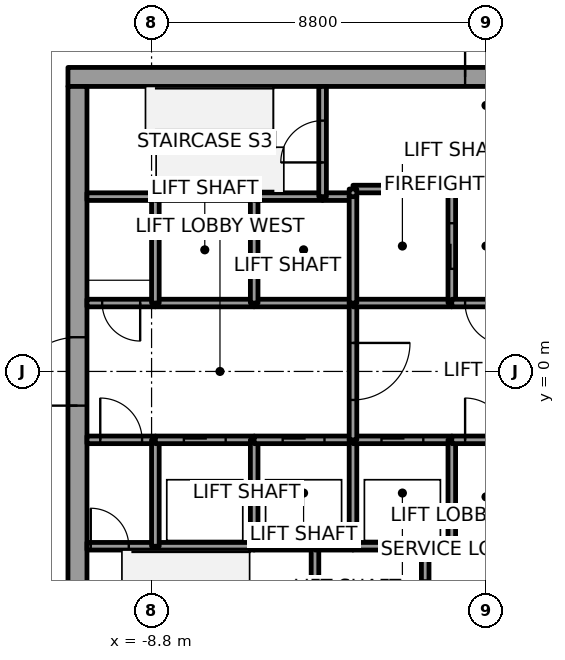
"""IFC4 building model, lengths in metres.
Left out: names, types, materials, properties, quantities, classifications, styles, units other than length and angle.
Written with IfcOpenShell. Run it as: python <this file> out.ifc"""

import sys

from ifc_helpers import new_model, si_unit, direction, frame, frame_2d, origin, place, context, subcontext, project, spatial, rectangle, extrude, element, fill, save


model = new_model("IFC4")
c1 = context("Model", 3, precision=1e-05, world=origin(), true_north=direction((0.0, 1.0)))
c2 = subcontext(c1, "Body", "Model", "MODEL_VIEW")
j1 = project(units=[si_unit("LENGTHUNIT", "METRE"), si_unit("PLANEANGLEUNIT", "RADIAN")], contexts=[c1])
p1 = place(None, origin())
s1 = spatial("IfcSite", under=j1, at=p1, CompositionType="ELEMENT")
p2 = place(p1, origin())
s2 = spatial("IfcBuilding", under=s1, at=p2, CompositionType="ELEMENT")
p3 = place(p2, frame((0.0, 0.0, 133.8)))
s3 = spatial("IfcBuildingStorey", under=s2, at=p3, CompositionType="ELEMENT", Elevation=133.8)
p4 = place(p3, frame((-11.0, 7.75, 0.0), z_axis=(0.0, 0.0, 1.0), x_axis=(1.0, 0.0, 0.0)))
e1 = element("IfcWall", 1, at=p4, inside=s3, PredefinedType="SHEAR", context=c2, shape_type="SweptSolid", body=[
    extrude(rectangle(XDim=22.0, YDim=0.5, at=frame_2d((11.0, 0.0))), origin(), (0.0, 0.0, 1.0), 4.0),
])
p5 = place(p4, frame((10.45, 0.0, 0.0)))
e2 = element("IfcOpeningElement", 2, at=p5, cuts=e1, PredefinedType="OPENING", context=c2, shape_type="SweptSolid", body=[
    extrude(rectangle(XDim=1.1, YDim=2.1, at=frame_2d((0.55, 1.05))), frame((0.0, 0.25, 0.0), z_axis=(0.0, -1.0, 0.0), x_axis=(1.0, 0.0, 0.0)), (0.0, 0.0, 1.0), 0.5),
])
p6 = place(p3, frame((-10.75, -7.5, 0.0), z_axis=(0.0, 0.0, 1.0), x_axis=(0.0, 1.0, 0.0)))
e3 = element("IfcWall", 3, at=p6, inside=s3, PredefinedType="SHEAR", context=c2, shape_type="SweptSolid", body=[
    extrude(rectangle(XDim=15.0, YDim=0.5, at=frame_2d((7.5, 0.0))), origin(), (0.0, 0.0, 1.0), 4.0),
])
p7 = place(p6, frame((6.6, 0.0, 0.0)))
e4 = element("IfcOpeningElement", 4, at=p7, cuts=e3, PredefinedType="OPENING", context=c2, shape_type="SweptSolid", body=[
    extrude(rectangle(XDim=1.8, YDim=2.1, at=frame_2d((0.9, 1.05))), frame((0.0, 0.25, 0.0), z_axis=(0.0, -1.0, 0.0), x_axis=(1.0, 0.0, 0.0)), (0.0, 0.0, 1.0), 0.5),
])
p8 = place(p3, frame((-10.5, -4.6, 0.0), z_axis=(0.0, 0.0, 1.0), x_axis=(1.0, 0.0, 0.0)))
e5 = element("IfcWall", 5, at=p8, inside=s3, PredefinedType="SOLIDWALL", context=c2, shape_type="SweptSolid", body=[
    extrude(rectangle(XDim=1.8, YDim=0.2, at=frame_2d((0.9, 0.0))), origin(), (0.0, 0.0, 1.0), 3.85),
])
p9 = place(p8, frame((0.1, 0.0, 0.0)))
e6 = element("IfcOpeningElement", 6, at=p9, cuts=e5, PredefinedType="OPENING", context=c2, shape_type="SweptSolid", body=[
    extrude(rectangle(XDim=1.0, YDim=2.1, at=frame_2d((0.5, 1.05))), frame((0.0, 0.1, 0.0), z_axis=(0.0, -1.0, 0.0), x_axis=(1.0, 0.0, 0.0)), (0.0, 0.0, 1.0), 0.2),
])
p10 = place(p3, frame((-10.5, -1.8, 0.0), z_axis=(0.0, 0.0, 1.0), x_axis=(1.0, 0.0, 0.0)))
e7 = element("IfcWall", 7, at=p10, inside=s3, PredefinedType="SOLIDWALL", context=c2, shape_type="SweptSolid", body=[
    extrude(rectangle(XDim=1.8, YDim=0.2, at=frame_2d((0.9, 0.0))), origin(), (0.0, 0.0, 1.0), 3.85),
])
p11 = place(p10, frame((0.35, 0.0, 0.0)))
e8 = element("IfcOpeningElement", 8, at=p11, cuts=e7, PredefinedType="OPENING", context=c2, shape_type="SweptSolid", body=[
    extrude(rectangle(XDim=1.1, YDim=2.1, at=frame_2d((0.55, 1.05))), frame((0.0, 0.1, 0.0), z_axis=(0.0, -1.0, 0.0), x_axis=(1.0, 0.0, 0.0)), (0.0, 0.0, 1.0), 0.2),
])
p12 = place(p3, frame((-8.7, 1.8, 0.0), z_axis=(0.0, 0.0, 1.0), x_axis=(-1.0, 0.0, 0.0)))
e9 = element("IfcWall", 9, at=p12, inside=s3, PredefinedType="SOLIDWALL", context=c2, shape_type="SweptSolid", body=[
    extrude(rectangle(XDim=1.8, YDim=0.2, at=frame_2d((0.9, 0.0))), origin(), (0.0, 0.0, 1.0), 3.85),
])
p13 = place(p12, frame((0.4, 0.0, 0.0)))
e10 = element("IfcOpeningElement", 10, at=p13, cuts=e9, PredefinedType="OPENING", context=c2, shape_type="SweptSolid", body=[
    extrude(rectangle(XDim=1.0, YDim=2.1, at=frame_2d((0.5, 1.05))), frame((0.0, 0.1, 0.0), z_axis=(0.0, -1.0, 0.0), x_axis=(1.0, 0.0, 0.0)), (0.0, 0.0, 1.0), 0.2),
])
p14 = place(p3, frame((-8.7, 4.6, 0.0), z_axis=(0.0, 0.0, 1.0), x_axis=(-1.0, 0.0, 0.0)))
e11 = element("IfcWall", 11, at=p14, inside=s3, PredefinedType="SOLIDWALL", context=c2, shape_type="SweptSolid", body=[
    extrude(rectangle(XDim=1.8, YDim=0.2, at=frame_2d((0.9, 0.0))), origin(), (0.0, 0.0, 1.0), 3.85),
])
p15 = place(p3, frame((-8.7, -4.6, 0.0), z_axis=(0.0, 0.0, 1.0), x_axis=(1.0, 0.0, 0.0)))
e12 = element("IfcWall", 12, at=p15, inside=s3, PredefinedType="SOLIDWALL", context=c2, shape_type="SweptSolid", body=[
    extrude(rectangle(XDim=2.6, YDim=0.2, at=frame_2d((1.3, 0.0))), origin(), (0.0, 0.0, 1.0), 3.85),
])
p16 = place(p3, frame((-8.7, -4.6, 0.0), z_axis=(0.0, 0.0, 1.0), x_axis=(0.0, 1.0, 0.0)))
e13 = element("IfcWall", 13, at=p16, inside=s3, PredefinedType="SOLIDWALL", context=c2, shape_type="SweptSolid", body=[
    extrude(rectangle(XDim=2.8, YDim=0.2, at=frame_2d((1.4, 0.0))), origin(), (0.0, 0.0, 1.0), 3.85),
])
p17 = place(p3, frame((-8.7, -1.8, 0.0), z_axis=(0.0, 0.0, 1.0), x_axis=(1.0, 0.0, 0.0)))
e14 = element("IfcWall", 14, at=p17, inside=s3, PredefinedType="SOLIDWALL", context=c2, shape_type="SweptSolid", body=[
    extrude(rectangle(XDim=2.6, YDim=0.2, at=frame_2d((1.3, 0.0))), origin(), (0.0, 0.0, 1.0), 3.85),
])
p18 = place(p17, frame((0.75, 0.0, 0.0)))
e15 = element("IfcOpeningElement", 15, at=p18, cuts=e14, PredefinedType="OPENING", context=c2, shape_type="SweptSolid", body=[
    extrude(rectangle(XDim=1.1, YDim=2.1, at=frame_2d((0.55, 1.05))), frame((0.0, 0.1, 0.0), z_axis=(0.0, -1.0, 0.0), x_axis=(1.0, 0.0, 0.0)), (0.0, 0.0, 1.0), 0.2),
])
p19 = place(p3, frame((-6.1, 1.8, 0.0), z_axis=(0.0, 0.0, 1.0), x_axis=(-1.0, 0.0, 0.0)))
e16 = element("IfcWall", 16, at=p19, inside=s3, PredefinedType="SOLIDWALL", context=c2, shape_type="SweptSolid", body=[
    extrude(rectangle(XDim=2.6, YDim=0.2, at=frame_2d((1.3, 0.0))), origin(), (0.0, 0.0, 1.0), 3.85),
])
p20 = place(p3, frame((-8.7, 1.8, 0.0), z_axis=(0.0, 0.0, 1.0), x_axis=(0.0, 1.0, 0.0)))
e17 = element("IfcWall", 17, at=p20, inside=s3, PredefinedType="SOLIDWALL", context=c2, shape_type="SweptSolid", body=[
    extrude(rectangle(XDim=2.8, YDim=0.2, at=frame_2d((1.4, 0.0))), origin(), (0.0, 0.0, 1.0), 3.85),
])
p21 = place(p3, frame((-6.1, 4.6, 0.0), z_axis=(0.0, 0.0, 1.0), x_axis=(-1.0, 0.0, 0.0)))
e18 = element("IfcWall", 18, at=p21, inside=s3, PredefinedType="SOLIDWALL", context=c2, shape_type="SweptSolid", body=[
    extrude(rectangle(XDim=2.6, YDim=0.2, at=frame_2d((1.3, 0.0))), origin(), (0.0, 0.0, 1.0), 3.85),
])
p22 = place(p3, frame((-6.1, -4.6, 0.0), z_axis=(0.0, 0.0, 1.0), x_axis=(1.0, 0.0, 0.0)))
e19 = element("IfcWall", 19, at=p22, inside=s3, PredefinedType="SOLIDWALL", context=c2, shape_type="SweptSolid", body=[
    extrude(rectangle(XDim=1.6, YDim=0.2, at=frame_2d((0.8, 0.0))), origin(), (0.0, 0.0, 1.0), 3.85),
])
p23 = place(p3, frame((-6.1, -4.6, 0.0), z_axis=(0.0, 0.0, 1.0), x_axis=(0.0, 1.0, 0.0)))
e20 = element("IfcWall", 20, at=p23, inside=s3, PredefinedType="SOLIDWALL", context=c2, shape_type="SweptSolid", body=[
    extrude(rectangle(XDim=2.8, YDim=0.2, at=frame_2d((1.4, 0.0))), origin(), (0.0, 0.0, 1.0), 3.85),
])
p24 = place(p3, frame((-6.1, -1.8, 0.0), z_axis=(0.0, 0.0, 1.0), x_axis=(1.0, 0.0, 0.0)))
e21 = element("IfcWall", 21, at=p24, inside=s3, PredefinedType="SOLIDWALL", context=c2, shape_type="SweptSolid", body=[
    extrude(rectangle(XDim=2.6, YDim=0.2, at=frame_2d((1.3, 0.0))), origin(), (0.0, 0.0, 1.0), 3.85),
])
p25 = place(p24, frame((0.75, 0.0, 0.0)))
e22 = element("IfcOpeningElement", 22, at=p25, cuts=e21, PredefinedType="OPENING", context=c2, shape_type="SweptSolid", body=[
    extrude(rectangle(XDim=1.1, YDim=2.1, at=frame_2d((0.55, 1.05))), frame((0.0, 0.1, 0.0), z_axis=(0.0, -1.0, 0.0), x_axis=(1.0, 0.0, 0.0)), (0.0, 0.0, 1.0), 0.2),
])
p26 = place(p3, frame((-3.5, 1.8, 0.0), z_axis=(0.0, 0.0, 1.0), x_axis=(-1.0, 0.0, 0.0)))
e23 = element("IfcWall", 23, at=p26, inside=s3, PredefinedType="SOLIDWALL", context=c2, shape_type="SweptSolid", body=[
    extrude(rectangle(XDim=2.6, YDim=0.2, at=frame_2d((1.3, 0.0))), origin(), (0.0, 0.0, 1.0), 3.85),
])
p27 = place(p3, frame((-6.1, 1.8, 0.0), z_axis=(0.0, 0.0, 1.0), x_axis=(0.0, 1.0, 0.0)))
e24 = element("IfcWall", 24, at=p27, inside=s3, PredefinedType="SOLIDWALL", context=c2, shape_type="SweptSolid", body=[
    extrude(rectangle(XDim=2.8, YDim=0.2, at=frame_2d((1.4, 0.0))), origin(), (0.0, 0.0, 1.0), 3.85),
])
p28 = place(p3, frame((-4.3, 4.6, 0.0), z_axis=(0.0, 0.0, 1.0), x_axis=(-1.0, 0.0, 0.0)))
e25 = element("IfcWall", 25, at=p28, inside=s3, PredefinedType="SOLIDWALL", context=c2, shape_type="SweptSolid", body=[
    extrude(rectangle(XDim=1.8, YDim=0.2, at=frame_2d((0.9, 0.0))), origin(), (0.0, 0.0, 1.0), 3.85),
])
p29 = place(p3, frame((-4.5, -4.6, 0.0), z_axis=(0.0, 0.0, 1.0), x_axis=(0.0, -1.0, 0.0)))
e26 = element("IfcWall", 26, at=p29, inside=s3, PredefinedType="SOLIDWALL", context=c2, shape_type="SweptSolid", body=[
    extrude(rectangle(XDim=2.9, YDim=0.2, at=frame_2d((1.45, 0.0))), origin(), (0.0, 0.0, 1.0), 3.85),
])
p30 = place(p3, frame((-4.5, -4.6, 0.0), z_axis=(0.0, 0.0, 1.0), x_axis=(1.0, 0.0, 0.0)))
e27 = element("IfcWall", 27, at=p30, inside=s3, PredefinedType="SOLIDWALL", context=c2, shape_type="SweptSolid", body=[
    extrude(rectangle(XDim=1.0, YDim=0.2, at=frame_2d((0.5, 0.0))), origin(), (0.0, 0.0, 1.0), 3.85),
])
p31 = place(p3, frame((-3.5, 4.6, 0.0), z_axis=(0.0, 0.0, 1.0), x_axis=(-1.0, 0.0, 0.0)))
e28 = element("IfcWall", 28, at=p31, inside=s3, PredefinedType="SOLIDWALL", context=c2, shape_type="SweptSolid", body=[
    extrude(rectangle(XDim=0.8, YDim=0.2, at=frame_2d((0.4, 0.0))), origin(), (0.0, 0.0, 1.0), 3.85),
])
p32 = place(p3, frame((-4.3, 4.6, 0.0), z_axis=(0.0, 0.0, 1.0), x_axis=(0.0, 1.0, 0.0)))
e29 = element("IfcWall", 29, at=p32, inside=s3, PredefinedType="SOLIDWALL", context=c2, shape_type="SweptSolid", body=[
    extrude(rectangle(XDim=2.9, YDim=0.2, at=frame_2d((1.45, 0.0))), origin(), (0.0, 0.0, 1.0), 3.85),
])
p33 = place(p32, frame((0.9, 0.0, 0.0)))
e30 = element("IfcOpeningElement", 30, at=p33, cuts=e29, PredefinedType="OPENING", context=c2, shape_type="SweptSolid", body=[
    extrude(rectangle(XDim=1.1, YDim=2.1, at=frame_2d((0.55, 1.05))), frame((0.0, 0.1, 0.0), z_axis=(0.0, -1.0, 0.0), x_axis=(1.0, 0.0, 0.0)), (0.0, 0.0, 1.0), 0.2),
])
p34 = place(p3, frame((-3.5, -4.6, 0.0), z_axis=(0.0, 0.0, 1.0), x_axis=(1.0, 0.0, 0.0)))
e31 = element("IfcWall", 31, at=p34, inside=s3, PredefinedType="SOLIDWALL", context=c2, shape_type="SweptSolid", body=[
    extrude(rectangle(XDim=1.9, YDim=0.2, at=frame_2d((0.95, 0.0))), origin(), (0.0, 0.0, 1.0), 3.85),
])
p35 = place(p3, frame((-3.5, -4.6, 0.0), z_axis=(0.0, 0.0, 1.0), x_axis=(0.0, 1.0, 0.0)))
e32 = element("IfcWall", 32, at=p35, inside=s3, PredefinedType="SOLIDWALL", context=c2, shape_type="SweptSolid", body=[
    extrude(rectangle(XDim=2.8, YDim=0.2, at=frame_2d((1.4, 0.0))), origin(), (0.0, 0.0, 1.0), 3.85),
])
p36 = place(p3, frame((-3.5, -1.8, 0.0), z_axis=(0.0, 0.0, 1.0), x_axis=(1.0, 0.0, 0.0)))
e33 = element("IfcWall", 33, at=p36, inside=s3, PredefinedType="SOLIDWALL", context=c2, shape_type="SweptSolid", body=[
    extrude(rectangle(XDim=2.6, YDim=0.2, at=frame_2d((1.3, 0.0))), origin(), (0.0, 0.0, 1.0), 3.85),
])
p37 = place(p36, frame((0.75, 0.0, 0.0)))
e34 = element("IfcOpeningElement", 34, at=p37, cuts=e33, PredefinedType="OPENING", context=c2, shape_type="SweptSolid", body=[
    extrude(rectangle(XDim=1.1, YDim=2.1, at=frame_2d((0.55, 1.05))), frame((0.0, 0.1, 0.0), z_axis=(0.0, -1.0, 0.0), x_axis=(1.0, 0.0, 0.0)), (0.0, 0.0, 1.0), 0.2),
])
p38 = place(p3, frame((-3.5, 1.8, 0.0), z_axis=(0.0, 0.0, 1.0), x_axis=(0.0, -1.0, 0.0)))
e35 = element("IfcWall", 35, at=p38, inside=s3, PredefinedType="SOLIDWALL", context=c2, shape_type="SweptSolid", body=[
    extrude(rectangle(XDim=3.6, YDim=0.2, at=frame_2d((1.8, 0.0))), origin(), (0.0, 0.0, 1.0), 3.85),
])
p39 = place(p38, frame((1.05, 0.0, 0.0)))
e36 = element("IfcOpeningElement", 36, at=p39, cuts=e35, PredefinedType="OPENING", context=c2, shape_type="SweptSolid", body=[
    extrude(rectangle(XDim=1.5, YDim=2.1, at=frame_2d((0.75, 1.05))), frame((0.0, 0.1, 0.0), z_axis=(0.0, -1.0, 0.0), x_axis=(1.0, 0.0, 0.0)), (0.0, 0.0, 1.0), 0.2),
])
p40 = place(p3, frame((-0.9, 1.8, 0.0), z_axis=(0.0, 0.0, 1.0), x_axis=(-1.0, 0.0, 0.0)))
e37 = element("IfcWall", 37, at=p40, inside=s3, PredefinedType="SOLIDWALL", context=c2, shape_type="SweptSolid", body=[
    extrude(rectangle(XDim=2.6, YDim=0.2, at=frame_2d((1.3, 0.0))), origin(), (0.0, 0.0, 1.0), 3.85),
])
p41 = place(p3, frame((-3.5, 4.6, 0.0), z_axis=(0.0, 0.0, 1.0), x_axis=(0.0, -1.0, 0.0)))
e38 = element("IfcWall", 38, at=p41, inside=s3, PredefinedType="SOLIDWALL", context=c2, shape_type="SweptSolid", body=[
    extrude(rectangle(XDim=2.8, YDim=0.2, at=frame_2d((1.4, 0.0))), origin(), (0.0, 0.0, 1.0), 3.85),
])
p42 = place(p3, frame((-0.9, 1.8, 0.0), z_axis=(0.0, 0.0, 1.0), x_axis=(0.0, 1.0, 0.0)))
e39 = element("IfcWall", 39, at=p42, inside=s3, PredefinedType="SOLIDWALL", context=c2, shape_type="SweptSolid", body=[
    extrude(rectangle(XDim=3.0, YDim=0.2, at=frame_2d((1.5, 0.0))), origin(), (0.0, 0.0, 1.0), 3.85),
])
p43 = place(p42, frame((0.9, 0.0, 0.0)))
e40 = element("IfcOpeningElement", 40, at=p43, cuts=e39, PredefinedType="OPENING", context=c2, shape_type="SweptSolid", body=[
    extrude(rectangle(XDim=1.2, YDim=2.1, at=frame_2d((0.6, 1.05))), frame((0.0, 0.1, 0.0), z_axis=(0.0, -1.0, 0.0), x_axis=(1.0, 0.0, 0.0)), (0.0, 0.0, 1.0), 0.2),
])
p44 = place(p3, frame((-0.9, 4.8, 0.0), z_axis=(0.0, 0.0, 1.0), x_axis=(-1.0, 0.0, 0.0)))
e41 = element("IfcWall", 41, at=p44, inside=s3, PredefinedType="SOLIDWALL", context=c2, shape_type="SweptSolid", body=[
    extrude(rectangle(XDim=2.6, YDim=0.2, at=frame_2d((1.3, 0.0))), origin(), (0.0, 0.0, 1.0), 3.85),
])
p45 = place(p3, frame((-3.5, 4.8, 0.0), z_axis=(0.0, 0.0, 1.0), x_axis=(0.0, -1.0, 0.0)))
e42 = element("IfcWall", 42, at=p45, inside=s3, PredefinedType="SOLIDWALL", context=c2, shape_type="SweptSolid", body=[
    extrude(rectangle(XDim=0.2, YDim=0.2, at=frame_2d((0.1, 0.0))), origin(), (0.0, 0.0, 1.0), 3.85),
])
p46 = place(p3, frame((-1.6, -7.5, 0.0), z_axis=(0.0, 0.0, 1.0), x_axis=(0.0, 1.0, 0.0)))
e43 = element("IfcWall", 43, at=p46, inside=s3, PredefinedType="SOLIDWALL", context=c2, shape_type="SweptSolid", body=[
    extrude(rectangle(XDim=2.9, YDim=0.2, at=frame_2d((1.45, 0.0))), origin(), (0.0, 0.0, 1.0), 3.85),
])
p47 = place(p46, frame((0.9, 0.0, 0.0)))
e44 = element("IfcOpeningElement", 44, at=p47, cuts=e43, PredefinedType="OPENING", context=c2, shape_type="SweptSolid", body=[
    extrude(rectangle(XDim=1.1, YDim=2.1, at=frame_2d((0.55, 1.05))), frame((0.0, 0.1, 0.0), z_axis=(0.0, -1.0, 0.0), x_axis=(1.0, 0.0, 0.0)), (0.0, 0.0, 1.0), 0.2),
])
p48 = place(p3, frame((-1.6, -4.6, 0.0), z_axis=(0.0, 0.0, 1.0), x_axis=(1.0, 0.0, 0.0)))
e45 = element("IfcWall", 45, at=p48, inside=s3, PredefinedType="SOLIDWALL", context=c2, shape_type="SweptSolid", body=[
    extrude(rectangle(XDim=0.7, YDim=0.2, at=frame_2d((0.35, 0.0))), origin(), (0.0, 0.0, 1.0), 3.85),
])
p49 = place(p3, frame((-0.9, -4.6, 0.0), z_axis=(0.0, 0.0, 1.0), x_axis=(0.0, 1.0, 0.0)))
e46 = element("IfcWall", 46, at=p49, inside=s3, PredefinedType="SOLIDWALL", context=c2, shape_type="SweptSolid", body=[
    extrude(rectangle(XDim=2.8, YDim=0.2, at=frame_2d((1.4, 0.0))), origin(), (0.0, 0.0, 1.0), 3.85),
])
p50 = place(p3, frame((-0.9, -1.8, 0.0), z_axis=(0.0, 0.0, 1.0), x_axis=(1.0, 0.0, 0.0)))
e47 = element("IfcWall", 47, at=p50, inside=s3, PredefinedType="SOLIDWALL", context=c2, shape_type="SweptSolid", body=[
    extrude(rectangle(XDim=1.8, YDim=0.2, at=frame_2d((0.9, 0.0))), origin(), (0.0, 0.0, 1.0), 3.85),
])
p51 = place(p50, frame((0.35, 0.0, 0.0)))
e48 = element("IfcOpeningElement", 48, at=p51, cuts=e47, PredefinedType="OPENING", context=c2, shape_type="SweptSolid", body=[
    extrude(rectangle(XDim=1.1, YDim=2.1, at=frame_2d((0.55, 1.05))), frame((0.0, 0.1, 0.0), z_axis=(0.0, -1.0, 0.0), x_axis=(1.0, 0.0, 0.0)), (0.0, 0.0, 1.0), 0.2),
])
p52 = place(p3, frame((0.9, 1.8, 0.0), z_axis=(0.0, 0.0, 1.0), x_axis=(-1.0, 0.0, 0.0)))
e49 = element("IfcWall", 49, at=p52, inside=s3, PredefinedType="SOLIDWALL", context=c2, shape_type="SweptSolid", body=[
    extrude(rectangle(XDim=1.8, YDim=0.2, at=frame_2d((0.9, 0.0))), origin(), (0.0, 0.0, 1.0), 3.85),
])
p53 = place(p52, frame((0.35, 0.0, 0.0)))
e50 = element("IfcOpeningElement", 50, at=p53, cuts=e49, PredefinedType="OPENING", context=c2, shape_type="SweptSolid", body=[
    extrude(rectangle(XDim=1.1, YDim=2.1, at=frame_2d((0.55, 1.05))), frame((0.0, 0.1, 0.0), z_axis=(0.0, -1.0, 0.0), x_axis=(1.0, 0.0, 0.0)), (0.0, 0.0, 1.0), 0.2),
])
p54 = place(p18, origin())
e51 = element("IfcDoor", 51, at=p54, inside=s3, OperationType="SLIDING_TO_RIGHT", PredefinedType="DOOR", context=c2, shape_type="SweptSolid", body=[
    extrude(rectangle(XDim=1.1, YDim=2.1, at=frame_2d((0.55, 1.05))), frame((0.0, 0.025, 0.0), z_axis=(0.0, -1.0, 0.0), x_axis=(1.0, 0.0, 0.0)), (0.0, 0.0, 1.0), 0.05),
])
fill(e15, e51)
p55 = place(p25, origin())
e52 = element("IfcDoor", 52, at=p55, inside=s3, OperationType="SLIDING_TO_LEFT", PredefinedType="DOOR", context=c2, shape_type="SweptSolid", body=[
    extrude(rectangle(XDim=1.1, YDim=2.1, at=frame_2d((0.55, 1.05))), frame((0.0, 0.025, 0.0), z_axis=(0.0, -1.0, 0.0), x_axis=(1.0, 0.0, 0.0)), (0.0, 0.0, 1.0), 0.05),
])
fill(e22, e52)
p56 = place(p37, origin())
e53 = element("IfcDoor", 53, at=p56, inside=s3, OperationType="SLIDING_TO_LEFT", PredefinedType="DOOR", context=c2, shape_type="SweptSolid", body=[
    extrude(rectangle(XDim=1.1, YDim=2.1, at=frame_2d((0.55, 1.05))), frame((0.0, 0.025, 0.0), z_axis=(0.0, -1.0, 0.0), x_axis=(1.0, 0.0, 0.0)), (0.0, 0.0, 1.0), 0.05),
])
fill(e34, e53)
p57 = place(p43, origin())
e54 = element("IfcDoor", 54, at=p57, inside=s3, OperationType="SLIDING_TO_LEFT", PredefinedType="DOOR", context=c2, shape_type="SweptSolid", body=[
    extrude(rectangle(XDim=1.2, YDim=2.1, at=frame_2d((0.6, 1.05))), frame((0.0, 0.025, 0.0), z_axis=(0.0, -1.0, 0.0), x_axis=(1.0, 0.0, 0.0)), (0.0, 0.0, 1.0), 0.05),
])
fill(e40, e54)
p58 = place(p39, origin())
e55 = element("IfcDoor", 55, at=p58, inside=s3, OperationType="DOUBLE_DOOR_SINGLE_SWING", PredefinedType="DOOR", context=c2, shape_type="SweptSolid", body=[
    extrude(rectangle(XDim=1.5, YDim=2.1, at=frame_2d((0.75, 1.05))), frame((0.0, 0.025, 0.0), z_axis=(0.0, -1.0, 0.0), x_axis=(1.0, 0.0, 0.0)), (0.0, 0.0, 1.0), 0.05),
])
fill(e36, e55)
p59 = place(p11, origin())
e56 = element("IfcDoor", 56, at=p59, inside=s3, OperationType="SINGLE_SWING_LEFT", PredefinedType="DOOR", context=c2, shape_type="SweptSolid", body=[
    extrude(rectangle(XDim=1.1, YDim=2.1, at=frame_2d((0.55, 1.05))), frame((0.0, 0.025, 0.0), z_axis=(0.0, -1.0, 0.0), x_axis=(1.0, 0.0, 0.0)), (0.0, 0.0, 1.0), 0.05),
])
fill(e8, e56)
p60 = place(p53, origin())
e57 = element("IfcDoor", 57, at=p60, inside=s3, OperationType="SINGLE_SWING_RIGHT", PredefinedType="DOOR", context=c2, shape_type="SweptSolid", body=[
    extrude(rectangle(XDim=1.1, YDim=2.1, at=frame_2d((0.55, 1.05))), frame((0.0, 0.025, 0.0), z_axis=(0.0, -1.0, 0.0), x_axis=(1.0, 0.0, 0.0)), (0.0, 0.0, 1.0), 0.05),
])
fill(e50, e57)
p61 = place(p51, origin())
e58 = element("IfcDoor", 58, at=p61, inside=s3, OperationType="SINGLE_SWING_RIGHT", PredefinedType="DOOR", context=c2, shape_type="SweptSolid", body=[
    extrude(rectangle(XDim=1.1, YDim=2.1, at=frame_2d((0.55, 1.05))), frame((0.0, 0.025, 0.0), z_axis=(0.0, -1.0, 0.0), x_axis=(1.0, 0.0, 0.0)), (0.0, 0.0, 1.0), 0.05),
])
fill(e48, e58)
p62 = place(p13, origin())
e59 = element("IfcDoor", 59, at=p62, inside=s3, OperationType="SINGLE_SWING_LEFT", PredefinedType="DOOR", context=c2, shape_type="SweptSolid", body=[
    extrude(rectangle(XDim=1.0, YDim=2.1, at=frame_2d((0.5, 1.05))), frame((0.0, 0.025, 0.0), z_axis=(0.0, -1.0, 0.0), x_axis=(1.0, 0.0, 0.0)), (0.0, 0.0, 1.0), 0.05),
])
fill(e10, e59)
p63 = place(p9, origin())
e60 = element("IfcDoor", 60, at=p63, inside=s3, OperationType="SINGLE_SWING_LEFT", PredefinedType="DOOR", context=c2, shape_type="SweptSolid", body=[
    extrude(rectangle(XDim=1.0, YDim=2.1, at=frame_2d((0.5, 1.05))), frame((0.0, 0.025, 0.0), z_axis=(0.0, -1.0, 0.0), x_axis=(1.0, 0.0, 0.0)), (0.0, 0.0, 1.0), 0.05),
])
fill(e6, e60)
p64 = place(p33, origin())
e61 = element("IfcDoor", 61, at=p64, inside=s3, OperationType="SINGLE_SWING_RIGHT", PredefinedType="DOOR", context=c2, shape_type="SweptSolid", body=[
    extrude(rectangle(XDim=1.1, YDim=2.1, at=frame_2d((0.55, 1.05))), frame((0.0, 0.025, 0.0), z_axis=(0.0, -1.0, 0.0), x_axis=(1.0, 0.0, 0.0)), (0.0, 0.0, 1.0), 0.05),
])
fill(e30, e61)
p65 = place(p7, origin())
e62 = element("IfcDoor", 62, at=p65, inside=s3, OperationType="DOUBLE_DOOR_SINGLE_SWING", PredefinedType="DOOR", context=c2, shape_type="SweptSolid", body=[
    extrude(rectangle(XDim=1.8, YDim=2.1, at=frame_2d((0.9, 1.05))), frame((0.0, 0.025, 0.0), z_axis=(0.0, -1.0, 0.0), x_axis=(1.0, 0.0, 0.0)), (0.0, 0.0, 1.0), 0.05),
])
fill(e4, e62)
p66 = place(p5, origin())
e63 = element("IfcDoor", 63, at=p66, inside=s3, OperationType="SINGLE_SWING_RIGHT", PredefinedType="DOOR", context=c2, shape_type="SweptSolid", body=[
    extrude(rectangle(XDim=1.1, YDim=2.1, at=frame_2d((0.55, 1.05))), frame((0.0, 0.025, 0.0), z_axis=(0.0, -1.0, 0.0), x_axis=(1.0, 0.0, 0.0)), (0.0, 0.0, 1.0), 0.05),
])
fill(e2, e63)
save(model, sys.argv[1])
